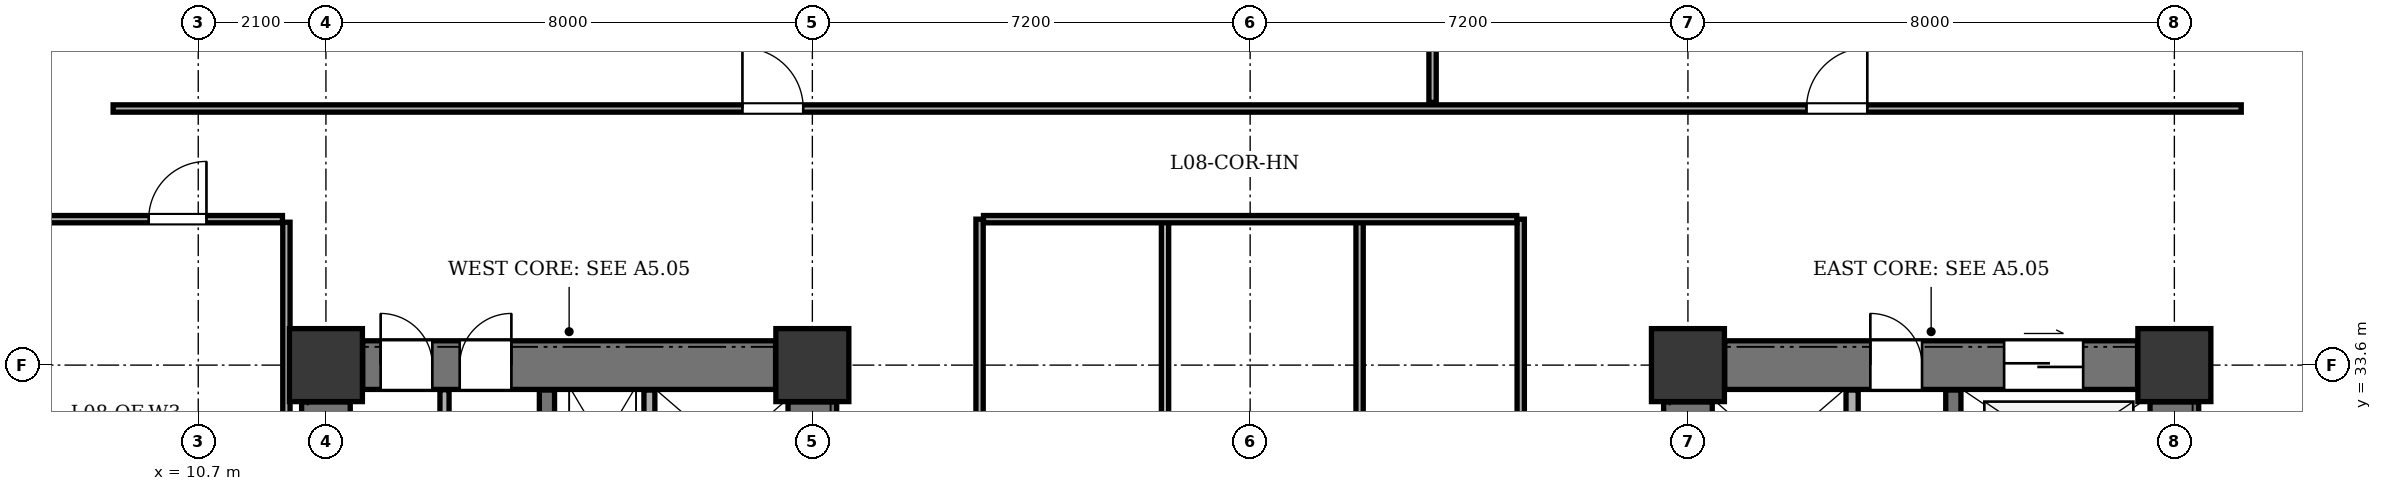
"""IFC4 building model, lengths in metres.
Left out: names, types, materials, properties, quantities, classifications, styles, units other than length and angle.
Written with IfcOpenShell. Run it as: python <this file> out.ifc"""

import sys

from ifc_helpers import new_model, si_unit, direction, frame, frame_2d, origin, origin_2d, place, context, subcontext, project, spatial, rectangle, extrude, element, fill, save


model = new_model("IFC4")
c1 = context("Model", 3, precision=1e-05, world=origin(), true_north=direction((0.0, 1.0)))
c2 = subcontext(c1, "Body", "Model", "MODEL_VIEW")
j1 = project(units=[si_unit("LENGTHUNIT", "METRE"), si_unit("PLANEANGLEUNIT", "RADIAN")], contexts=[c1])
p1 = place(None, origin())
s1 = spatial("IfcSite", under=j1, at=p1, CompositionType="ELEMENT")
p2 = place(p1, origin())
s2 = spatial("IfcBuilding", under=s1, at=p2, CompositionType="ELEMENT")
p3 = place(p2, frame((0.0, 0.0, 36.0)))
s3 = spatial("IfcBuildingStorey", under=s2, at=p3, CompositionType="ELEMENT", Elevation=36.0)
for number, where, z_axis, x_axis in (
    (1, (12.8, 33.6, 0.0), (0.0, 0.0, 1.0), (1.0, 0.0, 0.0)),
    (2, (20.8, 33.6, 0.0), (0.0, 0.0, 1.0), (1.0, 0.0, 0.0)),
    (3, (35.2, 33.6, 0.0), (0.0, 0.0, 1.0), (1.0, 0.0, 0.0)),
    (4, (43.2, 33.6, 0.0), (0.0, 0.0, 1.0), (1.0, 0.0, 0.0)),
):
    element("IfcColumn", number, at=place(p3, frame(where, z_axis=z_axis, x_axis=x_axis)), inside=s3, PredefinedType="COLUMN", context=c2, shape_type="SweptSolid", body=[
        extrude(rectangle(XDim=1.2, YDim=1.2, at=origin_2d()), origin(), (0.0, 0.0, 1.0), 3.9),
    ])
p4 = place(p3, frame((12.8, 21.405, 0.0), z_axis=(0.0, 0.0, 1.0), x_axis=(0.0, 1.0, 0.0)))
e5 = element("IfcWall", 5, at=p4, inside=s3, PredefinedType="SHEAR", context=c2, shape_type="SweptSolid", body=[
    extrude(rectangle(XDim=11.59, YDim=0.8, at=frame_2d((5.795, 0.0))), origin(), (0.0, 0.0, 1.0), 3.6),
])
p5 = place(p3, frame((13.405, 33.6, 0.0), z_axis=(0.0, 0.0, 1.0), x_axis=(1.0, 0.0, 0.0)))
e6 = element("IfcWall", 6, at=p5, inside=s3, PredefinedType="SHEAR", context=c2, shape_type="SweptSolid", body=[
    extrude(rectangle(XDim=6.79, YDim=0.8, at=frame_2d((3.395, 0.0))), origin(), (0.0, 0.0, 1.0), 3.6),
])
p6 = place(p5, frame((0.295, 0.0, 0.0)))
e7 = element("IfcOpeningElement", 7, at=p6, cuts=e6, PredefinedType="OPENING", context=c2, shape_type="SweptSolid", body=[
    extrude(rectangle(XDim=0.85, YDim=2.02, at=frame_2d((0.425, 1.01))), frame((0.0, 0.41, 0.0), z_axis=(0.0, -1.0, 0.0), x_axis=(1.0, 0.0, 0.0)), (0.0, 0.0, 1.0), 0.82),
])
p7 = place(p5, frame((1.595, 0.0, 0.0)))
e8 = element("IfcOpeningElement", 8, at=p7, cuts=e6, PredefinedType="OPENING", context=c2, shape_type="SweptSolid", body=[
    extrude(rectangle(XDim=0.85, YDim=2.02, at=frame_2d((0.425, 1.01))), frame((0.0, 0.41, 0.0), z_axis=(0.0, -1.0, 0.0), x_axis=(1.0, 0.0, 0.0)), (0.0, 0.0, 1.0), 0.82),
])
p8 = place(p3, frame((20.8, 21.405, 0.0), z_axis=(0.0, 0.0, 1.0), x_axis=(0.0, 1.0, 0.0)))
e9 = element("IfcWall", 9, at=p8, inside=s3, PredefinedType="SHEAR", context=c2, shape_type="SweptSolid", body=[
    extrude(rectangle(XDim=11.59, YDim=0.8, at=frame_2d((5.795, 0.0))), origin(), (0.0, 0.0, 1.0), 3.6),
])
p9 = place(p8, frame((1.195, 0.0, 0.0)))
e10 = element("IfcOpeningElement", 10, at=p9, cuts=e9, PredefinedType="OPENING", context=c2, shape_type="SweptSolid", body=[
    extrude(rectangle(XDim=1.2, YDim=2.15, at=frame_2d((0.6, 1.075))), frame((0.0, 0.41, 0.0), z_axis=(0.0, -1.0, 0.0), x_axis=(1.0, 0.0, 0.0)), (0.0, 0.0, 1.0), 0.82),
])
p10 = place(p8, frame((4.195, 0.0, 0.0)))
e11 = element("IfcOpeningElement", 11, at=p10, cuts=e9, PredefinedType="OPENING", context=c2, shape_type="SweptSolid", body=[
    extrude(rectangle(XDim=1.1, YDim=2.1, at=frame_2d((0.55, 1.05))), frame((0.0, 0.41, 0.0), z_axis=(0.0, -1.0, 0.0), x_axis=(1.0, 0.0, 0.0)), (0.0, 0.0, 1.0), 0.82),
])
p11 = place(p8, frame((6.145, 0.0, 0.0)))
e12 = element("IfcOpeningElement", 12, at=p11, cuts=e9, PredefinedType="OPENING", context=c2, shape_type="SweptSolid", body=[
    extrude(rectangle(XDim=1.1, YDim=2.1, at=frame_2d((0.55, 1.05))), frame((0.0, 0.41, 0.0), z_axis=(0.0, -1.0, 0.0), x_axis=(1.0, 0.0, 0.0)), (0.0, 0.0, 1.0), 0.82),
])
p12 = place(p8, frame((8.095, 0.0, 0.0)))
e13 = element("IfcOpeningElement", 13, at=p12, cuts=e9, PredefinedType="OPENING", context=c2, shape_type="SweptSolid", body=[
    extrude(rectangle(XDim=1.1, YDim=2.1, at=frame_2d((0.55, 1.05))), frame((0.0, 0.41, 0.0), z_axis=(0.0, -1.0, 0.0), x_axis=(1.0, 0.0, 0.0)), (0.0, 0.0, 1.0), 0.82),
])
p13 = place(p3, frame((16.435, 21.21, 0.0), z_axis=(0.0, 0.0, 1.0), x_axis=(0.0, 1.0, 0.0)))
e14 = element("IfcWall", 14, at=p13, inside=s3, PredefinedType="SHEAR", context=c2, shape_type="SweptSolid", body=[
    extrude(rectangle(XDim=11.98, YDim=0.25, at=frame_2d((5.99, 0.0))), origin(), (0.0, 0.0, 1.0), 3.6),
])
p14 = place(p13, frame((0.44, 0.0, 0.0)))
e15 = element("IfcOpeningElement", 15, at=p14, cuts=e14, PredefinedType="OPENING", context=c2, shape_type="SweptSolid", body=[
    extrude(rectangle(XDim=1.2, YDim=2.15, at=frame_2d((0.6, 1.075))), frame((0.0, 0.135, 0.0), z_axis=(0.0, -1.0, 0.0), x_axis=(1.0, 0.0, 0.0)), (0.0, 0.0, 1.0), 0.27),
])
p15 = place(p13, frame((2.59, 0.0, 0.0)))
e16 = element("IfcOpeningElement", 16, at=p15, cuts=e14, PredefinedType="OPENING", context=c2, shape_type="SweptSolid", body=[
    extrude(rectangle(XDim=1.15, YDim=2.15, at=frame_2d((0.575, 1.075))), frame((0.0, 0.135, 0.0), z_axis=(0.0, -1.0, 0.0), x_axis=(1.0, 0.0, 0.0)), (0.0, 0.0, 1.0), 0.27),
])
p16 = place(p3, frame((18.12, 31.17, 0.0), z_axis=(0.0, 0.0, 1.0), x_axis=(0.0, 1.0, 0.0)))
e17 = element("IfcWall", 17, at=p16, inside=s3, PredefinedType="PARTITIONING", context=c2, shape_type="SweptSolid", body=[
    extrude(rectangle(XDim=2.02, YDim=0.18, at=frame_2d((1.01, 0.0))), origin(), (0.0, 0.0, 1.0), 3.6),
])
p17 = place(p3, frame((43.2, 21.405, 0.0), z_axis=(0.0, 0.0, 1.0), x_axis=(0.0, 1.0, 0.0)))
e18 = element("IfcWall", 18, at=p17, inside=s3, PredefinedType="SHEAR", context=c2, shape_type="SweptSolid", body=[
    extrude(rectangle(XDim=11.59, YDim=0.8, at=frame_2d((5.795, 0.0))), origin(), (0.0, 0.0, 1.0), 3.6),
])
p18 = place(p3, frame((35.805, 33.6, 0.0), z_axis=(0.0, 0.0, 1.0), x_axis=(1.0, 0.0, 0.0)))
e19 = element("IfcWall", 19, at=p18, inside=s3, PredefinedType="SHEAR", context=c2, shape_type="SweptSolid", body=[
    extrude(rectangle(XDim=6.79, YDim=0.8, at=frame_2d((3.395, 0.0))), origin(), (0.0, 0.0, 1.0), 3.6),
])
p19 = place(p18, frame((4.595, 0.0, 0.0)))
e20 = element("IfcOpeningElement", 20, at=p19, cuts=e19, PredefinedType="OPENING", context=c2, shape_type="SweptSolid", body=[
    extrude(rectangle(XDim=1.3, YDim=2.15, at=frame_2d((0.65, 1.075))), frame((0.0, 0.41, 0.0), z_axis=(0.0, -1.0, 0.0), x_axis=(1.0, 0.0, 0.0)), (0.0, 0.0, 1.0), 0.82),
])
p20 = place(p18, frame((2.395, 0.0, 0.0)))
e21 = element("IfcOpeningElement", 21, at=p20, cuts=e19, PredefinedType="OPENING", context=c2, shape_type="SweptSolid", body=[
    extrude(rectangle(XDim=0.85, YDim=2.02, at=frame_2d((0.425, 1.01))), frame((0.0, 0.41, 0.0), z_axis=(0.0, -1.0, 0.0), x_axis=(1.0, 0.0, 0.0)), (0.0, 0.0, 1.0), 0.82),
])
p21 = place(p3, frame((35.2, 21.405, 0.0), z_axis=(0.0, 0.0, 1.0), x_axis=(0.0, 1.0, 0.0)))
e22 = element("IfcWall", 22, at=p21, inside=s3, PredefinedType="SHEAR", context=c2, shape_type="SweptSolid", body=[
    extrude(rectangle(XDim=11.59, YDim=0.8, at=frame_2d((5.795, 0.0))), origin(), (0.0, 0.0, 1.0), 3.6),
])
p22 = place(p21, frame((1.195, 0.0, 0.0)))
e23 = element("IfcOpeningElement", 23, at=p22, cuts=e22, PredefinedType="OPENING", context=c2, shape_type="SweptSolid", body=[
    extrude(rectangle(XDim=1.2, YDim=2.15, at=frame_2d((0.6, 1.075))), frame((0.0, 0.41, 0.0), z_axis=(0.0, -1.0, 0.0), x_axis=(1.0, 0.0, 0.0)), (0.0, 0.0, 1.0), 0.82),
])
p23 = place(p3, frame((39.565, 21.21, 0.0), z_axis=(0.0, 0.0, 1.0), x_axis=(0.0, 1.0, 0.0)))
e24 = element("IfcWall", 24, at=p23, inside=s3, PredefinedType="SHEAR", context=c2, shape_type="SweptSolid", body=[
    extrude(rectangle(XDim=11.98, YDim=0.25, at=frame_2d((5.99, 0.0))), origin(), (0.0, 0.0, 1.0), 3.6),
])
p24 = place(p23, frame((0.44, 0.0, 0.0)))
e25 = element("IfcOpeningElement", 25, at=p24, cuts=e24, PredefinedType="OPENING", context=c2, shape_type="SweptSolid", body=[
    extrude(rectangle(XDim=1.2, YDim=2.15, at=frame_2d((0.6, 1.075))), frame((0.0, 0.135, 0.0), z_axis=(0.0, -1.0, 0.0), x_axis=(1.0, 0.0, 0.0)), (0.0, 0.0, 1.0), 0.27),
])
p25 = place(p23, frame((2.59, 0.0, 0.0)))
e26 = element("IfcOpeningElement", 26, at=p25, cuts=e24, PredefinedType="OPENING", context=c2, shape_type="SweptSolid", body=[
    extrude(rectangle(XDim=1.15, YDim=2.15, at=frame_2d((0.575, 1.075))), frame((0.0, 0.135, 0.0), z_axis=(0.0, -1.0, 0.0), x_axis=(1.0, 0.0, 0.0)), (0.0, 0.0, 1.0), 0.27),
])
p26 = place(p3, frame((37.9, 25.27, 0.0), z_axis=(0.0, 0.0, 1.0), x_axis=(0.0, 1.0, 0.0)))
e27 = element("IfcWall", 27, at=p26, inside=s3, PredefinedType="SOLIDWALL", context=c2, shape_type="SweptSolid", body=[
    extrude(rectangle(XDim=7.92, YDim=0.2, at=frame_2d((3.96, 0.0))), origin(), (0.0, 0.0, 1.0), 3.6),
])
p27 = place(p3, frame((14.75, 30.96, 0.0), z_axis=(0.0, 0.0, 1.0), x_axis=(0.0, 1.0, 0.0)))
e28 = element("IfcWall", 28, at=p27, inside=s3, PredefinedType="PARTITIONING", context=c2, shape_type="SweptSolid", body=[
    extrude(rectangle(XDim=2.235, YDim=0.15, at=frame_2d((1.118, 0.0))), origin(), (0.0, 0.0, 1.0), 3.6),
])
p28 = place(p27, frame((0.47, 0.0, 0.0)))
e29 = element("IfcOpeningElement", 29, at=p28, cuts=e28, PredefinedType="OPENING", context=c2, shape_type="SweptSolid", body=[
    extrude(rectangle(XDim=0.85, YDim=2.02, at=frame_2d((0.425, 1.01))), frame((0.0, 0.085, 0.0), z_axis=(0.0, -1.0, 0.0), x_axis=(1.0, 0.0, 0.0)), (0.0, 0.0, 1.0), 0.17),
])
for number, where, z_axis, x_axis in (
    (30, (23.55, 24.715, 0.0), (0.0, 0.0, 1.0), (0.0, 1.0, 0.0)),
    (31, (32.45, 24.715, 0.0), (0.0, 0.0, 1.0), (0.0, 1.0, 0.0)),
    (32, (26.6, 24.715, 0.0), (0.0, 0.0, 1.0), (0.0, 1.0, 0.0)),
):
    element("IfcWall", number, at=place(p3, frame(where, z_axis=z_axis, x_axis=x_axis)), inside=s3, PredefinedType="PARTITIONING", context=c2, shape_type="SweptSolid", body=[
        extrude(rectangle(XDim=11.285, YDim=0.12, at=frame_2d((5.643, 0.0))), origin(), (0.0, 0.0, 1.0), 3.6),
    ])
p29 = place(p3, frame((29.8, 24.715, 0.0), z_axis=(0.0, 0.0, 1.0), x_axis=(0.0, 1.0, 0.0)))
e33 = element("IfcWall", 33, at=p29, inside=s3, PredefinedType="PARTITIONING", context=c2, shape_type="SweptSolid", body=[
    extrude(rectangle(XDim=11.285, YDim=0.12, at=frame_2d((5.643, 0.0))), origin(), (0.0, 0.0, 1.0), 3.135),
])
p30 = place(p3, frame((23.615, 36.0, 0.0), z_axis=(0.0, 0.0, 1.0), x_axis=(1.0, 0.0, 0.0)))
e34 = element("IfcWall", 34, at=p30, inside=s3, PredefinedType="PARTITIONING", context=c2, shape_type="SweptSolid", body=[
    extrude(rectangle(XDim=8.77, YDim=0.12, at=frame_2d((4.385, 0.0))), origin(), (0.0, 0.0, 1.0), 3.6),
])
p31 = place(p3, frame((9.3, 37.82, 0.0), z_axis=(0.0, 0.0, 1.0), x_axis=(1.0, 0.0, 0.0)))
e35 = element("IfcWall", 35, at=p31, inside=s3, PredefinedType="PARTITIONING", context=c2, shape_type="SweptSolid", body=[
    extrude(rectangle(XDim=35.0, YDim=0.12, at=frame_2d((17.5, 0.0))), origin(), (0.0, 0.0, 1.0), 3.6),
])
p32 = place(p31, frame((10.35, 0.0, 0.0)))
e36 = element("IfcOpeningElement", 36, at=p32, cuts=e35, PredefinedType="OPENING", context=c2, shape_type="SweptSolid", body=[
    extrude(rectangle(XDim=1.0, YDim=2.1, at=frame_2d((0.5, 1.05))), frame((0.0, 0.07, 0.0), z_axis=(0.0, -1.0, 0.0), x_axis=(1.0, 0.0, 0.0)), (0.0, 0.0, 1.0), 0.14),
])
p33 = place(p31, frame((27.85, 0.0, 0.0)))
e37 = element("IfcOpeningElement", 37, at=p33, cuts=e35, PredefinedType="OPENING", context=c2, shape_type="SweptSolid", body=[
    extrude(rectangle(XDim=1.0, YDim=2.1, at=frame_2d((0.5, 1.05))), frame((0.0, 0.07, 0.0), z_axis=(0.0, -1.0, 0.0), x_axis=(1.0, 0.0, 0.0)), (0.0, 0.0, 1.0), 0.14),
])
p34 = place(p3, frame((31.0, 37.92, 0.0), z_axis=(0.0, 0.0, 1.0), x_axis=(0.0, 1.0, 0.0)))
e38 = element("IfcWall", 38, at=p34, inside=s3, PredefinedType="PARTITIONING", context=c2, shape_type="SweptSolid", body=[
    extrude(rectangle(XDim=8.175, YDim=0.12, at=frame_2d((4.087, 0.0))), origin(), (0.0, 0.0, 1.0), 3.6),
])
p35 = place(p3, frame((12.15, 18.45, 0.0), z_axis=(0.0, 0.0, 1.0), x_axis=(0.0, 1.0, 0.0)))
e39 = element("IfcWall", 39, at=p35, inside=s3, PredefinedType="PARTITIONING", context=c2, shape_type="SweptSolid", body=[
    extrude(rectangle(XDim=17.5, YDim=0.12, at=frame_2d((8.75, 0.0))), origin(), (0.0, 0.0, 1.0), 3.6),
])
p36 = place(p3, frame((4.705, 36.0, 0.0), z_axis=(0.0, 0.0, 1.0), x_axis=(1.0, 0.0, 0.0)))
e40 = element("IfcWall", 40, at=p36, inside=s3, PredefinedType="PARTITIONING", context=c2, shape_type="SweptSolid", body=[
    extrude(rectangle(XDim=7.38, YDim=0.12, at=frame_2d((3.69, 0.0))), origin(), (0.0, 0.0, 1.0), 3.6),
])
p37 = place(p36, frame((5.18, 0.0, 0.0)))
e41 = element("IfcOpeningElement", 41, at=p37, cuts=e40, PredefinedType="OPENING", context=c2, shape_type="SweptSolid", body=[
    extrude(rectangle(XDim=0.95, YDim=2.1, at=frame_2d((0.475, 1.05))), frame((0.0, 0.07, 0.0), z_axis=(0.0, -1.0, 0.0), x_axis=(1.0, 0.0, 0.0)), (0.0, 0.0, 1.0), 0.14),
])
p38 = place(p6, origin())
e42 = element("IfcDoor", 42, at=p38, inside=s3, OperationType="SINGLE_SWING_LEFT", PredefinedType="DOOR", context=c2, shape_type="SweptSolid", body=[
    extrude(rectangle(XDim=0.85, YDim=2.02, at=frame_2d((0.425, 1.01))), frame((0.0, 0.025, 0.0), z_axis=(0.0, -1.0, 0.0), x_axis=(1.0, 0.0, 0.0)), (0.0, 0.0, 1.0), 0.05),
])
fill(e7, e42)
p39 = place(p7, origin())
e43 = element("IfcDoor", 43, at=p39, inside=s3, OperationType="SINGLE_SWING_RIGHT", PredefinedType="DOOR", context=c2, shape_type="SweptSolid", body=[
    extrude(rectangle(XDim=0.85, YDim=2.02, at=frame_2d((0.425, 1.01))), frame((0.0, 0.025, 0.0), z_axis=(0.0, -1.0, 0.0), x_axis=(1.0, 0.0, 0.0)), (0.0, 0.0, 1.0), 0.05),
])
fill(e8, e43)
p40 = place(p19, origin())
e44 = element("IfcDoor", 44, at=p40, inside=s3, OperationType="DOUBLE_DOOR_SLIDING", PredefinedType="DOOR", context=c2, shape_type="SweptSolid", body=[
    extrude(rectangle(XDim=1.3, YDim=2.15, at=frame_2d((0.65, 1.075))), frame((0.0, 0.025, 0.0), z_axis=(0.0, -1.0, 0.0), x_axis=(1.0, 0.0, 0.0)), (0.0, 0.0, 1.0), 0.05),
])
fill(e20, e44)
p41 = place(p20, origin())
e45 = element("IfcDoor", 45, at=p41, inside=s3, OperationType="SINGLE_SWING_LEFT", PredefinedType="DOOR", context=c2, shape_type="SweptSolid", body=[
    extrude(rectangle(XDim=0.85, YDim=2.02, at=frame_2d((0.425, 1.01))), frame((0.0, 0.025, 0.0), z_axis=(0.0, -1.0, 0.0), x_axis=(1.0, 0.0, 0.0)), (0.0, 0.0, 1.0), 0.05),
])
fill(e21, e45)
p42 = place(p32, origin())
e46 = element("IfcDoor", 46, at=p42, inside=s3, OperationType="SINGLE_SWING_LEFT", PredefinedType="DOOR", context=c2, shape_type="SweptSolid", body=[
    extrude(rectangle(XDim=1.0, YDim=2.1, at=frame_2d((0.5, 1.05))), frame((0.0, 0.025, 0.0), z_axis=(0.0, -1.0, 0.0), x_axis=(1.0, 0.0, 0.0)), (0.0, 0.0, 1.0), 0.05),
])
fill(e36, e46)
p43 = place(p33, origin())
e47 = element("IfcDoor", 47, at=p43, inside=s3, OperationType="SINGLE_SWING_RIGHT", PredefinedType="DOOR", context=c2, shape_type="SweptSolid", body=[
    extrude(rectangle(XDim=1.0, YDim=2.1, at=frame_2d((0.5, 1.05))), frame((0.0, 0.025, 0.0), z_axis=(0.0, -1.0, 0.0), x_axis=(1.0, 0.0, 0.0)), (0.0, 0.0, 1.0), 0.05),
])
fill(e37, e47)
p44 = place(p37, origin())
e48 = element("IfcDoor", 48, at=p44, inside=s3, OperationType="SINGLE_SWING_RIGHT", PredefinedType="DOOR", context=c2, shape_type="SweptSolid", body=[
    extrude(rectangle(XDim=0.95, YDim=2.1, at=frame_2d((0.475, 1.05))), frame((0.0, 0.025, 0.0), z_axis=(0.0, -1.0, 0.0), x_axis=(1.0, 0.0, 0.0)), (0.0, 0.0, 1.0), 0.05),
])
fill(e41, e48)
save(model, sys.argv[1])
